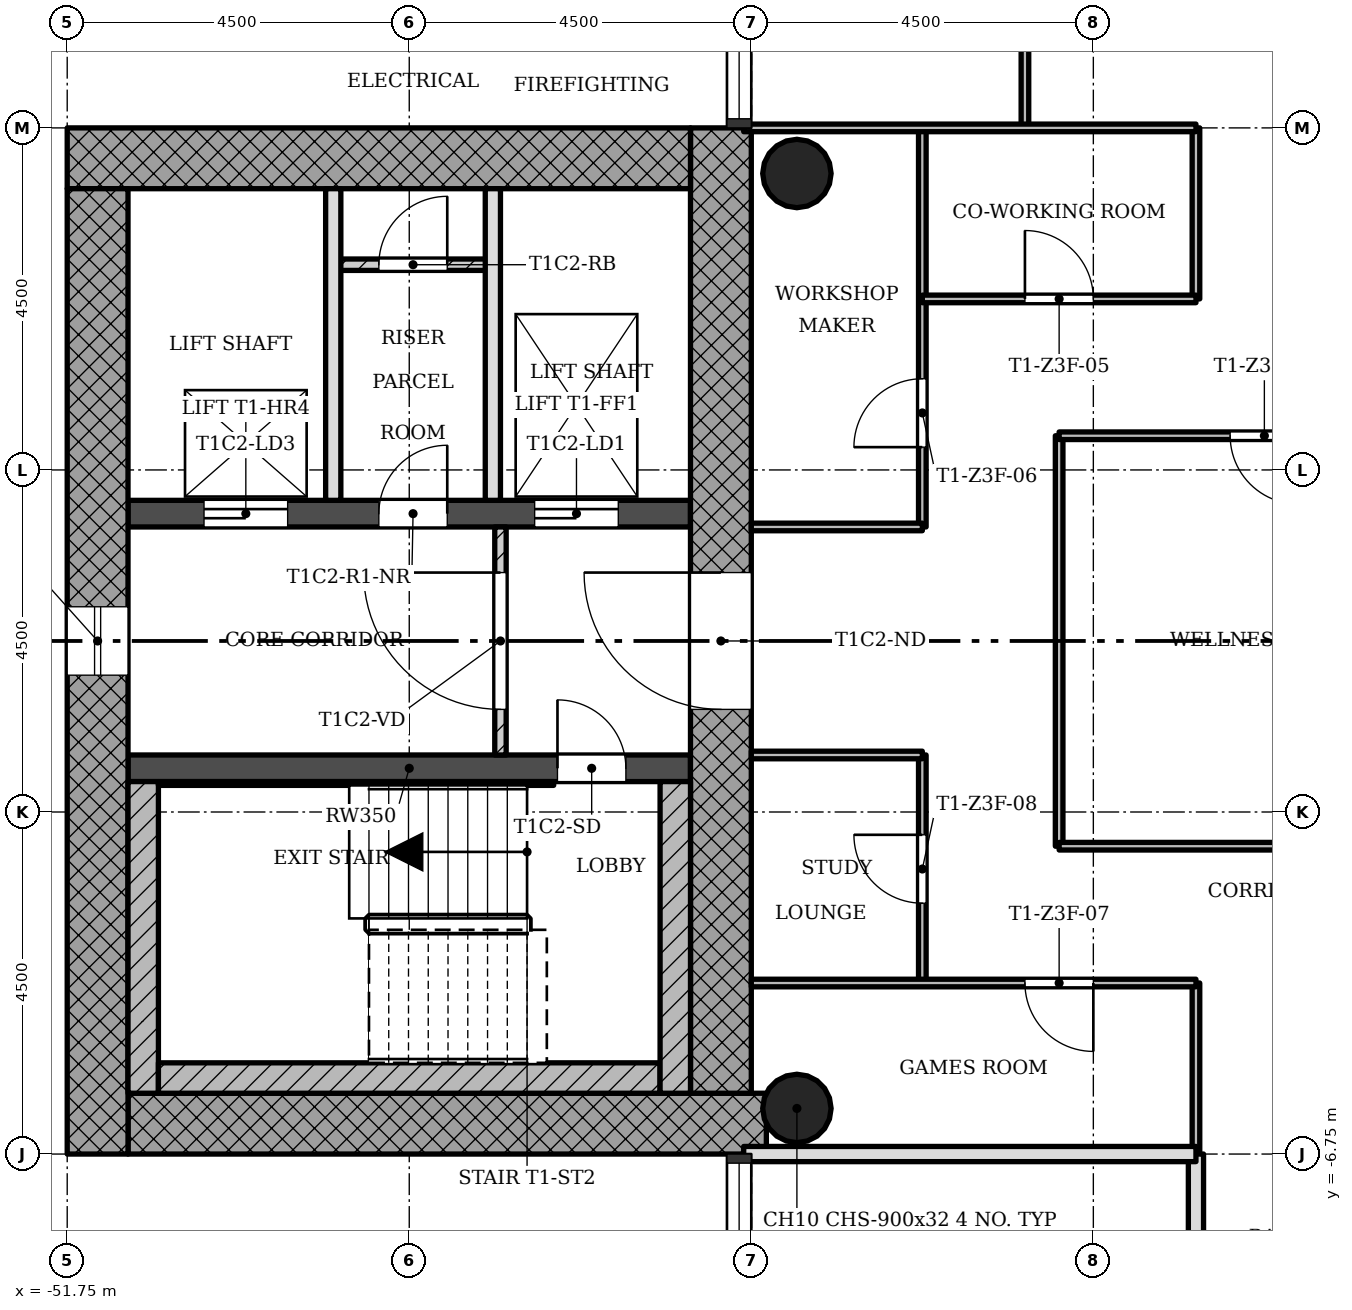
"""IFC4 building model, lengths in metres.
Left out: names, types, materials, properties, quantities, classifications, styles, units other than length and angle.
Written with IfcOpenShell. Run it as: python <this file> out.ifc"""

import sys

from ifc_helpers import new_model, si_unit, direction, frame, frame_2d, origin, origin_2d, place, context, subcontext, project, spatial, rectangle, hollow_circle, extrude, element, fill, save


model = new_model("IFC4")
c1 = context("Model", 3, precision=1e-05, world=origin(), true_north=direction((0.0, 1.0)))
c2 = subcontext(c1, "Body", "Model", "MODEL_VIEW")
j1 = project(units=[si_unit("LENGTHUNIT", "METRE"), si_unit("PLANEANGLEUNIT", "RADIAN")], contexts=[c1])
p1 = place(None, origin())
s1 = spatial("IfcSite", under=j1, at=p1, CompositionType="ELEMENT")
p2 = place(p1, origin())
s2 = spatial("IfcBuilding", under=s1, at=p2, CompositionType="ELEMENT")
p3 = place(p2, frame((0.0, 0.0, 164.3)))
s3 = spatial("IfcBuildingStorey", under=s2, at=p3, CompositionType="ELEMENT", Elevation=164.3)
p4 = place(p3, frame((-50.95, -6.35, 0.0), z_axis=(0.0, 0.0, 1.0), x_axis=(1.0, 0.0, 0.0)))
e1 = element("IfcWall", 1, at=p4, inside=s3, PredefinedType="SHEAR", context=c2, shape_type="SweptSolid", body=[
    extrude(rectangle(XDim=8.398, YDim=0.8, at=frame_2d((4.199, 0.0))), origin(), (0.0, 0.0, 1.0), 3.4),
])
p5 = place(p3, frame((-43.15, -5.95, 0.0), z_axis=(0.0, 0.0, 1.0), x_axis=(0.0, 1.0, 0.0)))
e2 = element("IfcWall", 2, at=p5, inside=s3, PredefinedType="SHEAR", context=c2, shape_type="SweptSolid", body=[
    extrude(rectangle(XDim=12.7, YDim=0.8, at=frame_2d((6.35, 0.0))), origin(), (0.0, 0.0, 1.0), 3.4),
])
p6 = place(p5, frame((5.05, 0.0, 0.0)))
e3 = element("IfcOpeningElement", 3, at=p6, cuts=e2, PredefinedType="OPENING", context=c2, shape_type="SweptSolid", body=[
    extrude(rectangle(XDim=1.8, YDim=2.1, at=frame_2d((0.9, 1.05))), frame((0.0, 0.41, 0.0), z_axis=(0.0, -1.0, 0.0), x_axis=(1.0, 0.0, 0.0)), (0.0, 0.0, 1.0), 0.82),
])
p7 = place(p3, frame((-43.55, 6.35, 0.0), z_axis=(0.0, 0.0, 1.0), x_axis=(-1.0, 0.0, 0.0)))
e4 = element("IfcWall", 4, at=p7, inside=s3, PredefinedType="SHEAR", context=c2, shape_type="SweptSolid", body=[
    extrude(rectangle(XDim=8.2, YDim=0.8, at=frame_2d((4.1, 0.0))), origin(), (0.0, 0.0, 1.0), 3.4),
])
p8 = place(p3, frame((-51.35, 5.95, 0.0), z_axis=(0.0, 0.0, 1.0), x_axis=(0.0, -1.0, 0.0)))
e5 = element("IfcWall", 5, at=p8, inside=s3, PredefinedType="SHEAR", context=c2, shape_type="SweptSolid", body=[
    extrude(rectangle(XDim=12.7, YDim=0.8, at=frame_2d((6.35, 0.0))), origin(), (0.0, 0.0, 1.0), 3.4),
])
p9 = place(p8, frame((5.5, 0.0, 0.45)))
e6 = element("IfcOpeningElement", 6, at=p9, cuts=e5, PredefinedType="OPENING", context=c2, shape_type="SweptSolid", body=[
    extrude(rectangle(XDim=0.9, YDim=2.4, at=frame_2d((0.45, 1.2))), frame((0.0, 0.41, 0.0), z_axis=(0.0, -1.0, 0.0), x_axis=(1.0, 0.0, 0.0)), (0.0, 0.0, 1.0), 0.82),
])
p10 = place(p3, frame((-50.95, -1.675, 0.0), z_axis=(0.0, 0.0, 1.0), x_axis=(1.0, 0.0, 0.0)))
e7 = element("IfcWall", 7, at=p10, inside=s3, PredefinedType="SHEAR", context=c2, shape_type="SweptSolid", body=[
    extrude(rectangle(XDim=7.4, YDim=0.35, at=frame_2d((3.7, 0.0))), origin(), (0.0, 0.0, 1.0), 3.4),
])
p11 = place(p10, frame((5.65, 0.0, 0.0)))
e8 = element("IfcOpeningElement", 8, at=p11, cuts=e7, PredefinedType="OPENING", context=c2, shape_type="SweptSolid", body=[
    extrude(rectangle(XDim=0.9, YDim=2.1, at=frame_2d((0.45, 1.05))), frame((0.0, 0.185, 0.0), z_axis=(0.0, -1.0, 0.0), x_axis=(1.0, 0.0, 0.0)), (0.0, 0.0, 1.0), 0.37),
])
p12 = place(p3, frame((-50.95, 1.675, 0.0), z_axis=(0.0, 0.0, 1.0), x_axis=(1.0, 0.0, 0.0)))
e9 = element("IfcWall", 9, at=p12, inside=s3, PredefinedType="SHEAR", context=c2, shape_type="SweptSolid", body=[
    extrude(rectangle(XDim=7.4, YDim=0.35, at=frame_2d((3.7, 0.0))), origin(), (0.0, 0.0, 1.0), 3.4),
])
p13 = place(p12, frame((5.35, 0.0, 0.0)))
e10 = element("IfcOpeningElement", 10, at=p13, cuts=e9, PredefinedType="OPENING", context=c2, shape_type="SweptSolid", body=[
    extrude(rectangle(XDim=1.1, YDim=2.1, at=frame_2d((0.55, 1.05))), frame((0.0, 0.185, 0.0), z_axis=(0.0, -1.0, 0.0), x_axis=(1.0, 0.0, 0.0)), (0.0, 0.0, 1.0), 0.37),
])
p14 = place(p12, frame((1.0, 0.0, 0.0)))
e11 = element("IfcOpeningElement", 11, at=p14, cuts=e9, PredefinedType="OPENING", context=c2, shape_type="SweptSolid", body=[
    extrude(rectangle(XDim=1.1, YDim=2.1, at=frame_2d((0.55, 1.05))), frame((0.0, 0.185, 0.0), z_axis=(0.0, -1.0, 0.0), x_axis=(1.0, 0.0, 0.0)), (0.0, 0.0, 1.0), 0.37),
])
p15 = place(p12, frame((3.3, 0.0, 0.0)))
e12 = element("IfcOpeningElement", 12, at=p15, cuts=e9, PredefinedType="OPENING", context=c2, shape_type="SweptSolid", body=[
    extrude(rectangle(XDim=0.9, YDim=2.1, at=frame_2d((0.45, 1.05))), frame((0.0, 0.185, 0.0), z_axis=(0.0, -1.0, 0.0), x_axis=(1.0, 0.0, 0.0)), (0.0, 0.0, 1.0), 0.37),
])
for number, where, z_axis, x_axis in (
    (13, (-42.15, -6.15, 0.0), (0.0, 0.0, 1.0), (1.0, 0.0, 0.0)),
    (14, (-42.15, 6.15, 0.0), (0.0, 0.0, 1.0), (1.0, 0.0, 0.0)),
):
    element("IfcColumn", number, at=place(p3, frame(where, z_axis=z_axis, x_axis=x_axis)), inside=s3, PredefinedType="COLUMN", context=c2, shape_type="SweptSolid", body=[
        extrude(hollow_circle(Radius=0.45, WallThickness=0.032, at=origin_2d()), origin(), (0.0, 0.0, 1.0), 3.4),
    ])
p16 = place(p3, frame((-46.05, 1.5, 0.0), z_axis=(0.0, 0.0, 1.0), x_axis=(0.0, -1.0, 0.0)))
e15 = element("IfcWall", 15, at=p16, inside=s3, PredefinedType="PARTITIONING", context=c2, shape_type="SweptSolid", body=[
    extrude(rectangle(XDim=3.0, YDim=0.15, at=frame_2d((1.5, 0.0))), origin(), (0.0, 0.0, 1.0), 3.0),
])
p17 = place(p16, frame((0.6, 0.0, 0.0)))
e16 = element("IfcOpeningElement", 16, at=p17, cuts=e15, PredefinedType="OPENING", context=c2, shape_type="SweptSolid", body=[
    extrude(rectangle(XDim=1.8, YDim=2.1, at=frame_2d((0.9, 1.05))), frame((0.0, 0.085, 0.0), z_axis=(0.0, -1.0, 0.0), x_axis=(1.0, 0.0, 0.0)), (0.0, 0.0, 1.0), 0.17),
])
for number, where, z_axis, x_axis in (
    (17, (-48.25, 5.95, 0.0), (0.0, 0.0, 1.0), (0.0, -1.0, 0.0)),
    (18, (-46.15, 5.95, 0.0), (0.0, 0.0, 1.0), (0.0, -1.0, 0.0)),
):
    element("IfcWall", number, at=place(p3, frame(where, z_axis=z_axis, x_axis=x_axis)), inside=s3, PredefinedType="SOLIDWALL", context=c2, shape_type="SweptSolid", body=[
        extrude(rectangle(XDim=4.1, YDim=0.2, at=frame_2d((2.05, 0.0))), origin(), (0.0, 0.0, 1.0), 3.0),
    ])
p18 = place(p3, frame((-46.15, 4.95, 0.0), z_axis=(0.0, 0.0, 1.0), x_axis=(-1.0, 0.0, 0.0)))
e19 = element("IfcWall", 19, at=p18, inside=s3, PredefinedType="PARTITIONING", context=c2, shape_type="SweptSolid", body=[
    extrude(rectangle(XDim=2.1, YDim=0.15, at=frame_2d((1.05, 0.0))), origin(), (0.0, 0.0, 1.0), 3.0),
])
p19 = place(p18, frame((0.6, 0.0, 0.0)))
e20 = element("IfcOpeningElement", 20, at=p19, cuts=e19, PredefinedType="OPENING", context=c2, shape_type="SweptSolid", body=[
    extrude(rectangle(XDim=0.9, YDim=2.1, at=frame_2d((0.45, 1.05))), frame((0.0, 0.085, 0.0), z_axis=(0.0, -1.0, 0.0), x_axis=(1.0, 0.0, 0.0)), (0.0, 0.0, 1.0), 0.17),
])
p20 = place(p3, frame((-40.5, -4.5, 0.0), z_axis=(0.0, 0.0, 1.0), x_axis=(0.0, 1.0, 0.0)))
e21 = element("IfcWall", 21, at=p20, inside=s3, PredefinedType="PARTITIONING", context=c2, shape_type="SweptSolid", body=[
    extrude(rectangle(XDim=3.0, YDim=0.1, at=frame_2d((1.5, 0.0))), origin(), (0.0, 0.0, 1.0), 3.0),
])
p21 = place(p20, frame((1.05, 0.0, 0.0)))
e22 = element("IfcOpeningElement", 22, at=p21, cuts=e21, PredefinedType="OPENING", context=c2, shape_type="SweptSolid", body=[
    extrude(rectangle(XDim=0.9, YDim=2.1, at=frame_2d((0.45, 1.05))), frame((0.0, 0.06, 0.0), z_axis=(0.0, -1.0, 0.0), x_axis=(1.0, 0.0, 0.0)), (0.0, 0.0, 1.0), 0.12),
])
p22 = place(p3, frame((-40.5, 1.5, 0.0), z_axis=(0.0, 0.0, 1.0), x_axis=(0.0, 1.0, 0.0)))
e23 = element("IfcWall", 23, at=p22, inside=s3, PredefinedType="PARTITIONING", context=c2, shape_type="SweptSolid", body=[
    extrude(rectangle(XDim=5.25, YDim=0.1, at=frame_2d((2.625, 0.0))), origin(), (0.0, 0.0, 1.0), 3.0),
])
p23 = place(p22, frame((1.05, 0.0, 0.0)))
e24 = element("IfcOpeningElement", 24, at=p23, cuts=e23, PredefinedType="OPENING", context=c2, shape_type="SweptSolid", body=[
    extrude(rectangle(XDim=0.9, YDim=2.1, at=frame_2d((0.45, 1.05))), frame((0.0, 0.06, 0.0), z_axis=(0.0, -1.0, 0.0), x_axis=(1.0, 0.0, 0.0)), (0.0, 0.0, 1.0), 0.12),
])
p24 = place(p3, frame((-39.15, 6.75, 0.0), z_axis=(0.0, 0.0, 1.0), x_axis=(0.0, 1.0, 0.0)))
e25 = element("IfcWall", 25, at=p24, inside=s3, PredefinedType="PARTITIONING", context=c2, shape_type="SweptSolid", body=[
    extrude(rectangle(XDim=4.5, YDim=0.1, at=frame_2d((2.25, 0.0))), origin(), (0.0, 0.0, 1.0), 3.0),
])
p25 = place(p24, frame((1.8, 0.0, 0.0)))
e26 = element("IfcOpeningElement", 26, at=p25, cuts=e25, PredefinedType="OPENING", context=c2, shape_type="SweptSolid", body=[
    extrude(rectangle(XDim=0.9, YDim=2.1, at=frame_2d((0.45, 1.05))), frame((0.0, 0.06, 0.0), z_axis=(0.0, -1.0, 0.0), x_axis=(1.0, 0.0, 0.0)), (0.0, 0.0, 1.0), 0.12),
])
p26 = place(p3, frame((-38.7, -2.7, 0.0), z_axis=(0.0, 0.0, 1.0), x_axis=(0.0, 1.0, 0.0)))
e27 = element("IfcWall", 27, at=p26, inside=s3, PredefinedType="PARTITIONING", context=c2, shape_type="SweptSolid", body=[
    extrude(rectangle(XDim=5.4, YDim=0.1, at=frame_2d((2.7, 0.0))), origin(), (0.0, 0.0, 1.0), 3.0),
])
for number, where, z_axis, x_axis in (
    (28, (-36.9, -6.75, 0.0), (0.0, 0.0, 1.0), (0.0, 1.0, 0.0)),
    (29, (-36.9, 4.5, 0.0), (0.0, 0.0, 1.0), (0.0, 1.0, 0.0)),
):
    element("IfcWall", number, at=place(p3, frame(where, z_axis=z_axis, x_axis=x_axis)), inside=s3, PredefinedType="PARTITIONING", context=c2, shape_type="SweptSolid", body=[
        extrude(rectangle(XDim=2.25, YDim=0.1, at=frame_2d((1.125, 0.0))), origin(), (0.0, 0.0, 1.0), 3.0),
    ])
p27 = place(p3, frame((-36.9, -8.55, 0.0), z_axis=(0.0, 0.0, 1.0), x_axis=(0.0, 1.0, 0.0)))
e30 = element("IfcWall", 30, at=p27, inside=s3, PredefinedType="SOLIDWALL", context=c2, shape_type="SweptSolid", body=[
    extrude(rectangle(XDim=1.8, YDim=0.2, at=frame_2d((0.9, 0.0))), origin(), (0.0, 0.0, 1.0), 3.0),
])
p28 = place(p3, frame((-42.85, -6.75, 0.0), z_axis=(0.0, 0.0, 1.0), x_axis=(1.0, 0.0, 0.0)))
e31 = element("IfcWall", 31, at=p28, inside=s3, PredefinedType="SOLIDWALL", context=c2, shape_type="SweptSolid", body=[
    extrude(rectangle(XDim=5.95, YDim=0.2, at=frame_2d((2.975, 0.0))), origin(), (0.0, 0.0, 1.0), 3.0),
])
p29 = place(p3, frame((-42.75, -4.5, 0.0), z_axis=(0.0, 0.0, 1.0), x_axis=(1.0, 0.0, 0.0)))
e32 = element("IfcWall", 32, at=p29, inside=s3, PredefinedType="PARTITIONING", context=c2, shape_type="SweptSolid", body=[
    extrude(rectangle(XDim=5.85, YDim=0.1, at=frame_2d((2.925, 0.0))), origin(), (0.0, 0.0, 1.0), 3.0),
])
p30 = place(p29, frame((3.6, 0.0, 0.0)))
e33 = element("IfcOpeningElement", 33, at=p30, cuts=e32, PredefinedType="OPENING", context=c2, shape_type="SweptSolid", body=[
    extrude(rectangle(XDim=0.9, YDim=2.1, at=frame_2d((0.45, 1.05))), frame((0.0, 0.06, 0.0), z_axis=(0.0, -1.0, 0.0), x_axis=(1.0, 0.0, 0.0)), (0.0, 0.0, 1.0), 0.12),
])
p31 = place(p3, frame((-38.7, -2.7, 0.0), z_axis=(0.0, 0.0, 1.0), x_axis=(1.0, 0.0, 0.0)))
e34 = element("IfcWall", 34, at=p31, inside=s3, PredefinedType="PARTITIONING", context=c2, shape_type="SweptSolid", body=[
    extrude(rectangle(XDim=5.4, YDim=0.1, at=frame_2d((2.7, 0.0))), origin(), (0.0, 0.0, 1.0), 3.0),
])
for number, where, z_axis, x_axis in (
    (35, (-42.75, -1.5, 0.0), (0.0, 0.0, 1.0), (1.0, 0.0, 0.0)),
    (36, (-42.75, 1.5, 0.0), (0.0, 0.0, 1.0), (1.0, 0.0, 0.0)),
):
    element("IfcWall", number, at=place(p3, frame(where, z_axis=z_axis, x_axis=x_axis)), inside=s3, PredefinedType="PARTITIONING", context=c2, shape_type="SweptSolid", body=[
        extrude(rectangle(XDim=2.25, YDim=0.1, at=frame_2d((1.125, 0.0))), origin(), (0.0, 0.0, 1.0), 3.0),
    ])
p32 = place(p3, frame((-38.7, 2.7, 0.0), z_axis=(0.0, 0.0, 1.0), x_axis=(1.0, 0.0, 0.0)))
e37 = element("IfcWall", 37, at=p32, inside=s3, PredefinedType="PARTITIONING", context=c2, shape_type="SweptSolid", body=[
    extrude(rectangle(XDim=5.4, YDim=0.1, at=frame_2d((2.7, 0.0))), origin(), (0.0, 0.0, 1.0), 3.0),
])
p33 = place(p32, frame((2.25, 0.0, 0.0)))
e38 = element("IfcOpeningElement", 38, at=p33, cuts=e37, PredefinedType="OPENING", context=c2, shape_type="SweptSolid", body=[
    extrude(rectangle(XDim=0.9, YDim=2.1, at=frame_2d((0.45, 1.05))), frame((0.0, 0.06, 0.0), z_axis=(0.0, -1.0, 0.0), x_axis=(1.0, 0.0, 0.0)), (0.0, 0.0, 1.0), 0.12),
])
p34 = place(p3, frame((-40.5, 4.5, 0.0), z_axis=(0.0, 0.0, 1.0), x_axis=(1.0, 0.0, 0.0)))
e39 = element("IfcWall", 39, at=p34, inside=s3, PredefinedType="PARTITIONING", context=c2, shape_type="SweptSolid", body=[
    extrude(rectangle(XDim=3.6, YDim=0.1, at=frame_2d((1.8, 0.0))), origin(), (0.0, 0.0, 1.0), 3.0),
])
p35 = place(p34, frame((1.35, 0.0, 0.0)))
e40 = element("IfcOpeningElement", 40, at=p35, cuts=e39, PredefinedType="OPENING", context=c2, shape_type="SweptSolid", body=[
    extrude(rectangle(XDim=0.9, YDim=2.1, at=frame_2d((0.45, 1.05))), frame((0.0, 0.06, 0.0), z_axis=(0.0, -1.0, 0.0), x_axis=(1.0, 0.0, 0.0)), (0.0, 0.0, 1.0), 0.12),
])
p36 = place(p3, frame((-42.85, 6.75, 0.0), z_axis=(0.0, 0.0, 1.0), x_axis=(1.0, 0.0, 0.0)))
e41 = element("IfcWall", 41, at=p36, inside=s3, PredefinedType="PARTITIONING", context=c2, shape_type="SweptSolid", body=[
    extrude(rectangle(XDim=5.95, YDim=0.1, at=frame_2d((2.975, 0.0))), origin(), (0.0, 0.0, 1.0), 3.0),
])
p37 = place(p3, frame((-50.75, -1.85, 0.0), z_axis=(0.0, 0.0, 1.0), x_axis=(0.0, -1.0, 0.0)))
e42 = element("IfcWall", 42, at=p37, inside=s3, PredefinedType="SHEAR", context=c2, shape_type="SweptSolid", body=[
    extrude(rectangle(XDim=4.1, YDim=0.4, at=frame_2d((2.05, 0.0))), origin(), (0.0, 0.0, 1.0), 3.4),
])
p38 = place(p3, frame((-43.95, -5.75, 0.0), z_axis=(0.0, 0.0, 1.0), x_axis=(-1.0, 0.0, 0.0)))
e43 = element("IfcWall", 43, at=p38, inside=s3, PredefinedType="SHEAR", context=c2, shape_type="SweptSolid", body=[
    extrude(rectangle(XDim=6.6, YDim=0.4, at=frame_2d((3.3, 0.0))), origin(), (0.0, 0.0, 1.0), 3.4),
])
p39 = place(p3, frame((-43.75, -1.85, 0.0), z_axis=(0.0, 0.0, 1.0), x_axis=(0.0, -1.0, 0.0)))
e44 = element("IfcWall", 44, at=p39, inside=s3, PredefinedType="SHEAR", context=c2, shape_type="SweptSolid", body=[
    extrude(rectangle(XDim=4.1, YDim=0.4, at=frame_2d((2.05, 0.0))), origin(), (0.0, 0.0, 1.0), 3.4),
])
p40 = place(p3, frame((-45.35, -1.875, 0.0), z_axis=(0.0, 0.0, 1.0), x_axis=(-1.0, 0.0, 0.0)))
e45 = element("IfcWall", 45, at=p40, inside=s3, PredefinedType="SHEAR", context=c2, shape_type="SweptSolid", body=[
    extrude(rectangle(XDim=5.2, YDim=0.05, at=frame_2d((2.6, 0.0))), origin(), (0.0, 0.0, 1.0), 3.4),
])
p41 = place(p9, origin())
e46 = element("IfcWindow", 46, at=p41, inside=s3, PartitioningType="SINGLE_PANEL", PredefinedType="WINDOW", context=c2, shape_type="SweptSolid", body=[
    extrude(rectangle(XDim=0.9, YDim=2.4, at=frame_2d((0.45, 1.2))), frame((0.0, 0.03, 0.0), z_axis=(0.0, -1.0, 0.0), x_axis=(1.0, 0.0, 0.0)), (0.0, 0.0, 1.0), 0.06),
])
fill(e6, e46)
p42 = place(p17, origin())
e47 = element("IfcDoor", 47, at=p42, inside=s3, OperationType="SINGLE_SWING_LEFT", PredefinedType="DOOR", context=c2, shape_type="SweptSolid", body=[
    extrude(rectangle(XDim=1.8, YDim=2.1, at=frame_2d((0.9, 1.05))), frame((0.0, 0.025, 0.0), z_axis=(0.0, -1.0, 0.0), x_axis=(1.0, 0.0, 0.0)), (0.0, 0.0, 1.0), 0.05),
])
fill(e16, e47)
p43 = place(p19, origin())
e48 = element("IfcDoor", 48, at=p43, inside=s3, OperationType="SINGLE_SWING_LEFT", PredefinedType="DOOR", context=c2, shape_type="SweptSolid", body=[
    extrude(rectangle(XDim=0.9, YDim=2.1, at=frame_2d((0.45, 1.05))), frame((0.0, 0.025, 0.0), z_axis=(0.0, -1.0, 0.0), x_axis=(1.0, 0.0, 0.0)), (0.0, 0.0, 1.0), 0.05),
])
fill(e20, e48)
p44 = place(p33, origin())
e49 = element("IfcDoor", 49, at=p44, inside=s3, OperationType="SINGLE_SWING_RIGHT", PredefinedType="DOOR", context=c2, shape_type="SweptSolid", body=[
    extrude(rectangle(XDim=0.9, YDim=2.1, at=frame_2d((0.45, 1.05))), frame((0.0, 0.025, 0.0), z_axis=(0.0, -1.0, 0.0), x_axis=(1.0, 0.0, 0.0)), (0.0, 0.0, 1.0), 0.05),
])
fill(e38, e49)
p45 = place(p35, origin())
e50 = element("IfcDoor", 50, at=p45, inside=s3, OperationType="SINGLE_SWING_RIGHT", PredefinedType="DOOR", context=c2, shape_type="SweptSolid", body=[
    extrude(rectangle(XDim=0.9, YDim=2.1, at=frame_2d((0.45, 1.05))), frame((0.0, 0.025, 0.0), z_axis=(0.0, -1.0, 0.0), x_axis=(1.0, 0.0, 0.0)), (0.0, 0.0, 1.0), 0.05),
])
fill(e40, e50)
p46 = place(p23, origin())
e51 = element("IfcDoor", 51, at=p46, inside=s3, OperationType="SINGLE_SWING_RIGHT", PredefinedType="DOOR", context=c2, shape_type="SweptSolid", body=[
    extrude(rectangle(XDim=0.9, YDim=2.1, at=frame_2d((0.45, 1.05))), frame((0.0, 0.025, 0.0), z_axis=(0.0, -1.0, 0.0), x_axis=(1.0, 0.0, 0.0)), (0.0, 0.0, 1.0), 0.05),
])
fill(e24, e51)
p47 = place(p30, origin())
e52 = element("IfcDoor", 52, at=p47, inside=s3, OperationType="SINGLE_SWING_RIGHT", PredefinedType="DOOR", context=c2, shape_type="SweptSolid", body=[
    extrude(rectangle(XDim=0.9, YDim=2.1, at=frame_2d((0.45, 1.05))), frame((0.0, 0.025, 0.0), z_axis=(0.0, -1.0, 0.0), x_axis=(1.0, 0.0, 0.0)), (0.0, 0.0, 1.0), 0.05),
])
fill(e33, e52)
p48 = place(p21, origin())
e53 = element("IfcDoor", 53, at=p48, inside=s3, OperationType="SINGLE_SWING_LEFT", PredefinedType="DOOR", context=c2, shape_type="SweptSolid", body=[
    extrude(rectangle(XDim=0.9, YDim=2.1, at=frame_2d((0.45, 1.05))), frame((0.0, 0.025, 0.0), z_axis=(0.0, -1.0, 0.0), x_axis=(1.0, 0.0, 0.0)), (0.0, 0.0, 1.0), 0.05),
])
fill(e22, e53)
p49 = place(p11, origin())
e54 = element("IfcDoor", 54, at=p49, inside=s3, OperationType="SINGLE_SWING_RIGHT", PredefinedType="DOOR", context=c2, shape_type="SweptSolid", body=[
    extrude(rectangle(XDim=0.9, YDim=2.1, at=frame_2d((0.45, 1.05))), frame((0.0, 0.025, 0.0), z_axis=(0.0, -1.0, 0.0), x_axis=(1.0, 0.0, 0.0)), (0.0, 0.0, 1.0), 0.05),
])
fill(e8, e54)
p50 = place(p13, origin())
e55 = element("IfcDoor", 55, at=p50, inside=s3, OperationType="SLIDING_TO_LEFT", PredefinedType="DOOR", context=c2, shape_type="SweptSolid", body=[
    extrude(rectangle(XDim=1.1, YDim=2.1, at=frame_2d((0.55, 1.05))), frame((0.0, 0.025, 0.0), z_axis=(0.0, -1.0, 0.0), x_axis=(1.0, 0.0, 0.0)), (0.0, 0.0, 1.0), 0.05),
])
fill(e10, e55)
p51 = place(p14, origin())
e56 = element("IfcDoor", 56, at=p51, inside=s3, OperationType="SLIDING_TO_LEFT", PredefinedType="DOOR", context=c2, shape_type="SweptSolid", body=[
    extrude(rectangle(XDim=1.1, YDim=2.1, at=frame_2d((0.55, 1.05))), frame((0.0, 0.025, 0.0), z_axis=(0.0, -1.0, 0.0), x_axis=(1.0, 0.0, 0.0)), (0.0, 0.0, 1.0), 0.05),
])
fill(e11, e56)
p52 = place(p15, origin())
e57 = element("IfcDoor", 57, at=p52, inside=s3, OperationType="SINGLE_SWING_LEFT", PredefinedType="DOOR", context=c2, shape_type="SweptSolid", body=[
    extrude(rectangle(XDim=0.9, YDim=2.1, at=frame_2d((0.45, 1.05))), frame((0.0, 0.025, 0.0), z_axis=(0.0, -1.0, 0.0), x_axis=(1.0, 0.0, 0.0)), (0.0, 0.0, 1.0), 0.05),
])
fill(e12, e57)
p53 = place(p6, origin())
e58 = element("IfcDoor", 58, at=p53, inside=s3, OperationType="SINGLE_SWING_LEFT", PredefinedType="DOOR", context=c2, shape_type="SweptSolid", body=[
    extrude(rectangle(XDim=1.8, YDim=2.1, at=frame_2d((0.9, 1.05))), frame((0.0, 0.025, 0.0), z_axis=(0.0, -1.0, 0.0), x_axis=(1.0, 0.0, 0.0)), (0.0, 0.0, 1.0), 0.05),
])
fill(e3, e58)
save(model, sys.argv[1])
